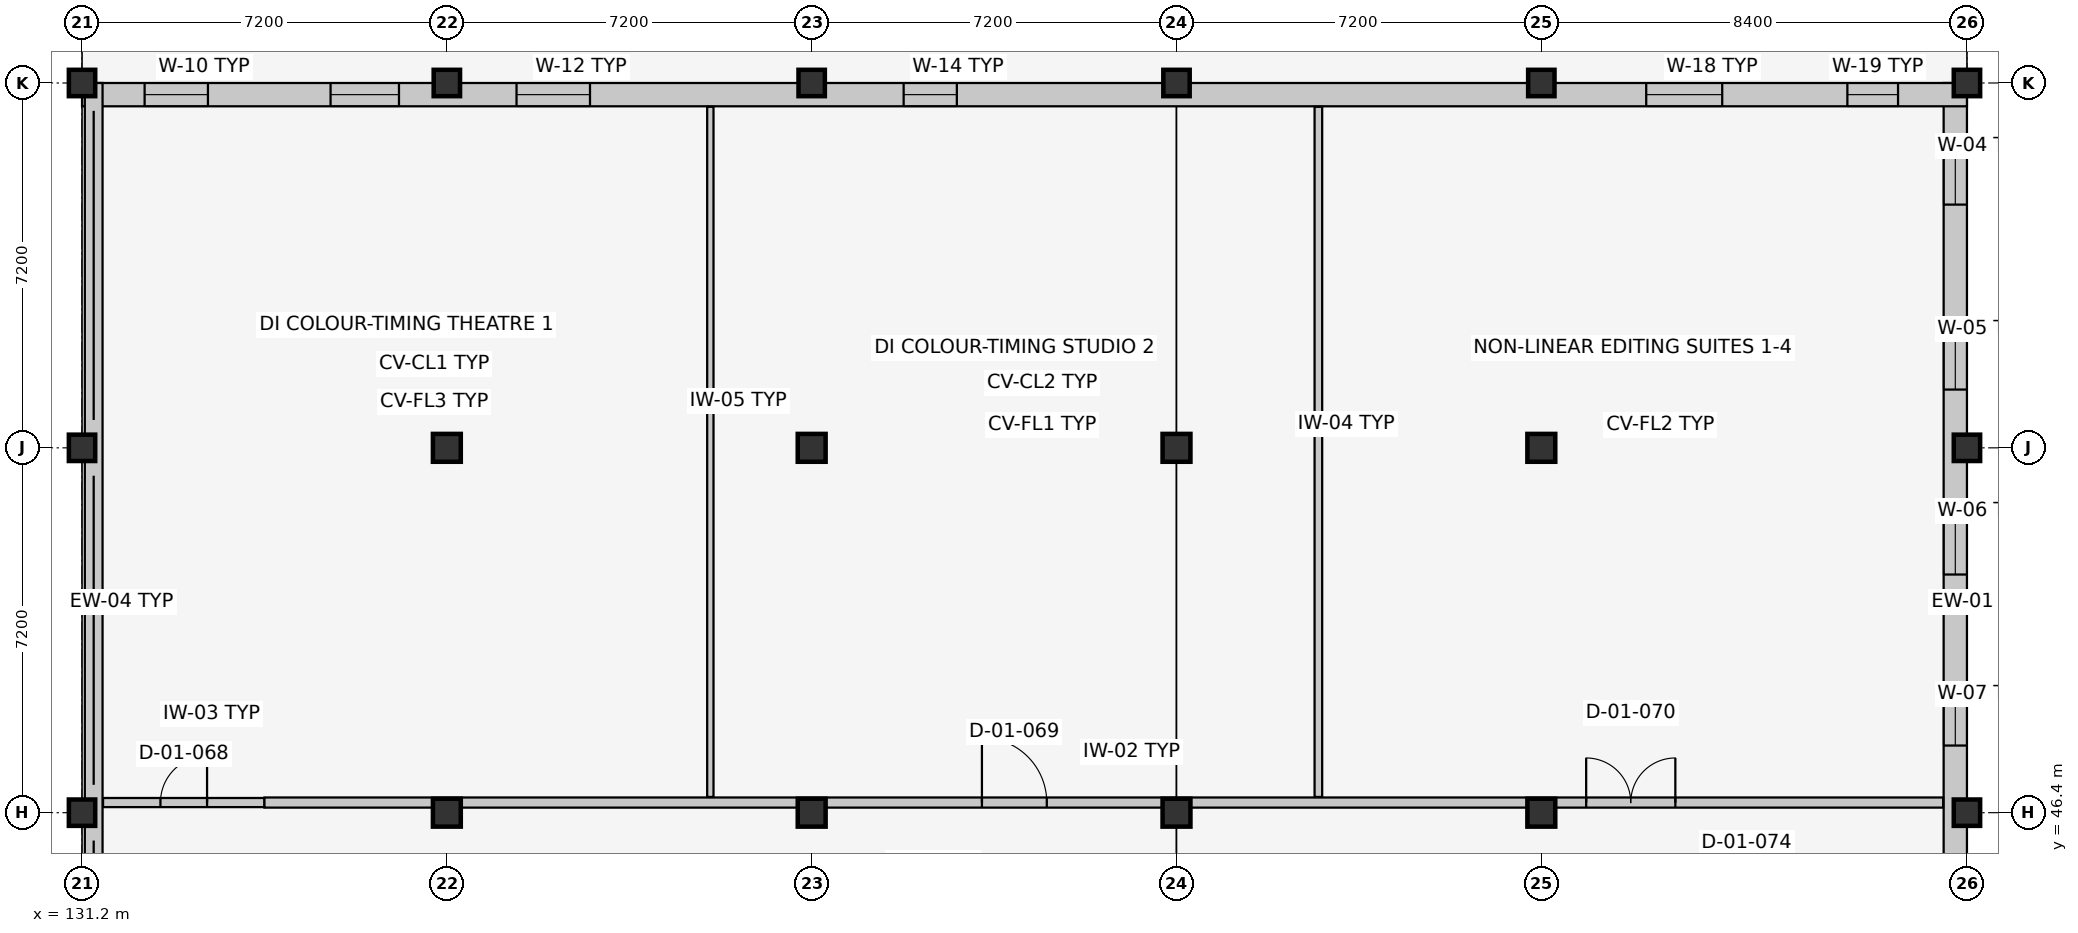
"""IFC4 building model, lengths in metres.
Left out: names, types, materials, properties, quantities, classifications, styles, units other than length and angle.
Written with IfcOpenShell. Run it as: python <this file> out.ifc"""

import sys

from ifc_helpers import new_model, si_unit, direction, frame, frame_2d, origin, origin_2d, place, context, subcontext, project, spatial, rectangle, extrude, element, fill, save


model = new_model("IFC4")
c1 = context("Model", 3, precision=1e-05, world=origin(), true_north=direction((0.0, 1.0)))
c2 = subcontext(c1, "Body", "Model", "MODEL_VIEW")
j1 = project(units=[si_unit("LENGTHUNIT", "METRE"), si_unit("PLANEANGLEUNIT", "RADIAN")], contexts=[c1])
p1 = place(None, origin())
s1 = spatial("IfcSite", under=j1, at=p1, CompositionType="ELEMENT")
p2 = place(p1, origin())
s2 = spatial("IfcBuilding", under=s1, at=p2, CompositionType="ELEMENT")
p3 = place(p2, frame((0.0, 0.0, 5.4)))
s3 = spatial("IfcBuildingStorey", under=s2, at=p3, CompositionType="ELEMENT", Elevation=5.4)
for number, where, z_axis, x_axis in (
    (1, (131.2, 46.4, 0.0), (0.0, 0.0, 1.0), (1.0, 0.0, 0.0)),
    (2, (131.2, 53.6, 0.0), (0.0, 0.0, 1.0), (1.0, 0.0, 0.0)),
    (3, (131.2, 60.8, 0.0), (0.0, 0.0, 1.0), (1.0, 0.0, 0.0)),
):
    element("IfcColumn", number, at=place(p3, frame(where, z_axis=z_axis, x_axis=x_axis)), inside=s3, PredefinedType="COLUMN", context=c2, shape_type="SweptSolid", body=[
        extrude(rectangle(XDim=0.52, YDim=0.52, at=origin_2d()), origin(), (0.0, 0.0, 1.0), 4.2),
    ])
for number, where, z_axis, x_axis in (
    (4, (138.4, 46.4, 0.0), (0.0, 0.0, 1.0), (1.0, 0.0, 0.0)),
    (5, (138.4, 53.6, 0.0), (0.0, 0.0, 1.0), (1.0, 0.0, 0.0)),
):
    element("IfcColumn", number, at=place(p3, frame(where, z_axis=z_axis, x_axis=x_axis)), inside=s3, PredefinedType="COLUMN", context=c2, shape_type="SweptSolid", body=[
        extrude(rectangle(XDim=0.55, YDim=0.55, at=origin_2d()), origin(), (0.0, 0.0, 1.0), 4.2),
    ])
p4 = place(p3, frame((138.4, 60.8, 0.0), z_axis=(0.0, 0.0, 1.0), x_axis=(1.0, 0.0, 0.0)))
e6 = element("IfcColumn", 6, at=p4, inside=s3, PredefinedType="COLUMN", context=c2, shape_type="SweptSolid", body=[
    extrude(rectangle(XDim=0.52, YDim=0.52, at=origin_2d()), origin(), (0.0, 0.0, 1.0), 4.2),
])
for number, where, z_axis, x_axis in (
    (7, (145.6, 46.4, 0.0), (0.0, 0.0, 1.0), (1.0, 0.0, 0.0)),
    (8, (145.6, 53.6, 0.0), (0.0, 0.0, 1.0), (1.0, 0.0, 0.0)),
):
    element("IfcColumn", number, at=place(p3, frame(where, z_axis=z_axis, x_axis=x_axis)), inside=s3, PredefinedType="COLUMN", context=c2, shape_type="SweptSolid", body=[
        extrude(rectangle(XDim=0.55, YDim=0.55, at=origin_2d()), origin(), (0.0, 0.0, 1.0), 4.2),
    ])
p5 = place(p3, frame((145.6, 60.8, 0.0), z_axis=(0.0, 0.0, 1.0), x_axis=(1.0, 0.0, 0.0)))
e9 = element("IfcColumn", 9, at=p5, inside=s3, PredefinedType="COLUMN", context=c2, shape_type="SweptSolid", body=[
    extrude(rectangle(XDim=0.52, YDim=0.52, at=origin_2d()), origin(), (0.0, 0.0, 1.0), 4.2),
])
for number, where, z_axis, x_axis in (
    (10, (152.8, 46.4, 0.0), (0.0, 0.0, 1.0), (1.0, 0.0, 0.0)),
    (11, (152.8, 53.6, 0.0), (0.0, 0.0, 1.0), (1.0, 0.0, 0.0)),
):
    element("IfcColumn", number, at=place(p3, frame(where, z_axis=z_axis, x_axis=x_axis)), inside=s3, PredefinedType="COLUMN", context=c2, shape_type="SweptSolid", body=[
        extrude(rectangle(XDim=0.55, YDim=0.55, at=origin_2d()), origin(), (0.0, 0.0, 1.0), 4.2),
    ])
p6 = place(p3, frame((152.8, 60.8, 0.0), z_axis=(0.0, 0.0, 1.0), x_axis=(1.0, 0.0, 0.0)))
e12 = element("IfcColumn", 12, at=p6, inside=s3, PredefinedType="COLUMN", context=c2, shape_type="SweptSolid", body=[
    extrude(rectangle(XDim=0.52, YDim=0.52, at=origin_2d()), origin(), (0.0, 0.0, 1.0), 4.2),
])
for number, where, z_axis, x_axis in (
    (13, (160.0, 46.4, 0.0), (0.0, 0.0, 1.0), (1.0, 0.0, 0.0)),
    (14, (160.0, 53.6, 0.0), (0.0, 0.0, 1.0), (1.0, 0.0, 0.0)),
):
    element("IfcColumn", number, at=place(p3, frame(where, z_axis=z_axis, x_axis=x_axis)), inside=s3, PredefinedType="COLUMN", context=c2, shape_type="SweptSolid", body=[
        extrude(rectangle(XDim=0.55, YDim=0.55, at=origin_2d()), origin(), (0.0, 0.0, 1.0), 4.2),
    ])
for number, where, z_axis, x_axis in (
    (15, (160.0, 60.8, 0.0), (0.0, 0.0, 1.0), (1.0, 0.0, 0.0)),
    (16, (168.4, 46.4, 0.0), (0.0, 0.0, 1.0), (1.0, 0.0, 0.0)),
    (17, (168.4, 53.6, 0.0), (0.0, 0.0, 1.0), (1.0, 0.0, 0.0)),
    (18, (168.4, 60.8, 0.0), (0.0, 0.0, 1.0), (1.0, 0.0, 0.0)),
):
    element("IfcColumn", number, at=place(p3, frame(where, z_axis=z_axis, x_axis=x_axis)), inside=s3, PredefinedType="COLUMN", context=c2, shape_type="SweptSolid", body=[
        extrude(rectangle(XDim=0.52, YDim=0.52, at=origin_2d()), origin(), (0.0, 0.0, 1.0), 4.2),
    ])
p7 = place(p3, frame((168.17, 60.8, 0.0), z_axis=(0.0, 0.0, 1.0), x_axis=(0.0, -1.0, 0.0)))
e19 = element("IfcWall", 19, at=p7, inside=s3, PredefinedType="SOLIDWALL", context=c2, shape_type="SweptSolid", body=[
    extrude(rectangle(XDim=21.6, YDim=0.46, at=frame_2d((10.8, 0.0))), origin(), (0.0, 0.0, 1.0), 3.215),
])
p8 = place(p7, frame((1.2, 0.0, 0.9)))
e20 = element("IfcOpeningElement", 20, at=p8, cuts=e19, PredefinedType="OPENING", context=c2, shape_type="SweptSolid", body=[
    extrude(rectangle(XDim=1.2, YDim=1.35, at=frame_2d((0.6, 0.675))), frame((0.0, 0.242, 0.0), z_axis=(0.0, -1.0, 0.0), x_axis=(1.0, 0.0, 0.0)), (0.0, 0.0, 1.0), 0.484),
])
p9 = place(p7, frame((4.75, 0.0, 0.9)))
e21 = element("IfcOpeningElement", 21, at=p9, cuts=e19, PredefinedType="OPENING", context=c2, shape_type="SweptSolid", body=[
    extrude(rectangle(XDim=1.3, YDim=1.35, at=frame_2d((0.65, 0.675))), frame((0.0, 0.242, 0.0), z_axis=(0.0, -1.0, 0.0), x_axis=(1.0, 0.0, 0.0)), (0.0, 0.0, 1.0), 0.484),
])
p10 = place(p7, frame((8.3, 0.0, 0.9)))
e22 = element("IfcOpeningElement", 22, at=p10, cuts=e19, PredefinedType="OPENING", context=c2, shape_type="SweptSolid", body=[
    extrude(rectangle(XDim=1.4, YDim=1.35, at=frame_2d((0.7, 0.675))), frame((0.0, 0.242, 0.0), z_axis=(0.0, -1.0, 0.0), x_axis=(1.0, 0.0, 0.0)), (0.0, 0.0, 1.0), 0.484),
])
p11 = place(p7, frame((12.125, 0.0, 0.9)))
e23 = element("IfcOpeningElement", 23, at=p11, cuts=e19, PredefinedType="OPENING", context=c2, shape_type="SweptSolid", body=[
    extrude(rectangle(XDim=0.95, YDim=1.45, at=frame_2d((0.475, 0.725))), frame((0.0, 0.242, 0.0), z_axis=(0.0, -1.0, 0.0), x_axis=(1.0, 0.0, 0.0)), (0.0, 0.0, 1.0), 0.484),
])
p12 = place(p7, frame((19.225, 0.0, 0.9)))
e24 = element("IfcOpeningElement", 24, at=p12, cuts=e19, PredefinedType="OPENING", context=c2, shape_type="SweptSolid", body=[
    extrude(rectangle(XDim=1.15, YDim=1.45, at=frame_2d((0.575, 0.725))), frame((0.0, 0.242, 0.0), z_axis=(0.0, -1.0, 0.0), x_axis=(1.0, 0.0, 0.0)), (0.0, 0.0, 1.0), 0.484),
])
p13 = place(p3, frame((131.2, 60.57, 0.0), z_axis=(0.0, 0.0, 1.0), x_axis=(1.0, 0.0, 0.0)))
e25 = element("IfcWall", 25, at=p13, inside=s3, PredefinedType="SOLIDWALL", context=c2, shape_type="SweptSolid", body=[
    extrude(rectangle(XDim=37.2, YDim=0.46, at=frame_2d((18.6, 0.0))), origin(), (0.0, 0.0, 1.0), 3.115),
])
p14 = place(p13, frame((1.235, 0.0, 0.9)))
e26 = element("IfcOpeningElement", 26, at=p14, cuts=e25, PredefinedType="OPENING", context=c2, shape_type="SweptSolid", body=[
    extrude(rectangle(XDim=1.25, YDim=1.45, at=frame_2d((0.625, 0.725))), frame((0.0, 0.242, 0.0), z_axis=(0.0, -1.0, 0.0), x_axis=(1.0, 0.0, 0.0)), (0.0, 0.0, 1.0), 0.484),
])
p15 = place(p13, frame((4.905, 0.0, 0.9)))
e27 = element("IfcOpeningElement", 27, at=p15, cuts=e25, PredefinedType="OPENING", context=c2, shape_type="SweptSolid", body=[
    extrude(rectangle(XDim=1.35, YDim=1.45, at=frame_2d((0.675, 0.725))), frame((0.0, 0.242, 0.0), z_axis=(0.0, -1.0, 0.0), x_axis=(1.0, 0.0, 0.0)), (0.0, 0.0, 1.0), 0.484),
])
p16 = place(p13, frame((8.575, 0.0, 0.9)))
e28 = element("IfcOpeningElement", 28, at=p16, cuts=e25, PredefinedType="OPENING", context=c2, shape_type="SweptSolid", body=[
    extrude(rectangle(XDim=1.45, YDim=1.45, at=frame_2d((0.725, 0.725))), frame((0.0, 0.242, 0.0), z_axis=(0.0, -1.0, 0.0), x_axis=(1.0, 0.0, 0.0)), (0.0, 0.0, 1.0), 0.484),
])
p17 = place(p13, frame((16.215, 0.0, 0.9)))
e29 = element("IfcOpeningElement", 29, at=p17, cuts=e25, PredefinedType="OPENING", context=c2, shape_type="SweptSolid", body=[
    extrude(rectangle(XDim=1.05, YDim=1.6, at=frame_2d((0.525, 0.8))), frame((0.0, 0.242, 0.0), z_axis=(0.0, -1.0, 0.0), x_axis=(1.0, 0.0, 0.0)), (0.0, 0.0, 1.0), 0.484),
])
p18 = place(p13, frame((30.87, 0.0, 0.9)))
e30 = element("IfcOpeningElement", 30, at=p18, cuts=e25, PredefinedType="OPENING", context=c2, shape_type="SweptSolid", body=[
    extrude(rectangle(XDim=1.5, YDim=1.6, at=frame_2d((0.75, 0.8))), frame((0.0, 0.242, 0.0), z_axis=(0.0, -1.0, 0.0), x_axis=(1.0, 0.0, 0.0)), (0.0, 0.0, 1.0), 0.484),
])
p19 = place(p13, frame((34.84, 0.0, 0.9)))
e31 = element("IfcOpeningElement", 31, at=p19, cuts=e25, PredefinedType="OPENING", context=c2, shape_type="SweptSolid", body=[
    extrude(rectangle(XDim=1.0, YDim=1.75, at=frame_2d((0.5, 0.875))), frame((0.0, 0.242, 0.0), z_axis=(0.0, -1.0, 0.0), x_axis=(1.0, 0.0, 0.0)), (0.0, 0.0, 1.0), 0.484),
])
p20 = place(p3, frame((131.43, 39.2, 0.0), z_axis=(0.0, 0.0, 1.0), x_axis=(0.0, 1.0, 0.0)))
e32 = element("IfcWall", 32, at=p20, inside=s3, PredefinedType="SOLIDWALL", context=c2, shape_type="SweptSolid", body=[
    extrude(rectangle(XDim=21.6, YDim=0.35, at=frame_2d((10.8, 0.0))), origin(), (0.0, 0.0, 1.0), 0.85),
])
p21 = place(p3, frame((131.615, 46.6, 0.0), z_axis=(0.0, 0.0, 1.0), x_axis=(1.0, 0.0, 0.0)))
e33 = element("IfcWall", 33, at=p21, inside=s3, PredefinedType="PARTITIONING", context=c2, shape_type="SweptSolid", body=[
    extrude(rectangle(XDim=3.185, YDim=0.18, at=frame_2d((1.593, 0.0))), origin(), (0.0, 0.0, 1.0), 3.285),
])
p22 = place(p21, frame((1.133, 0.0, 0.0)))
e34 = element("IfcOpeningElement", 34, at=p22, cuts=e33, PredefinedType="OPENING", context=c2, shape_type="SweptSolid", body=[
    extrude(rectangle(XDim=0.92, YDim=2.08, at=frame_2d((0.46, 1.04))), frame((0.0, 0.102, 0.0), z_axis=(0.0, -1.0, 0.0), x_axis=(1.0, 0.0, 0.0)), (0.0, 0.0, 1.0), 0.204),
])
p23 = place(p3, frame((134.8, 46.6, 0.0), z_axis=(0.0, 0.0, 1.0), x_axis=(1.0, 0.0, 0.0)))
e35 = element("IfcWall", 35, at=p23, inside=s3, PredefinedType="PARTITIONING", context=c2, shape_type="SweptSolid", body=[
    extrude(rectangle(XDim=33.13, YDim=0.2, at=frame_2d((16.565, 0.0))), origin(), (0.0, 0.0, 1.0), 2.935),
])
p24 = place(p23, frame((14.16, 0.0, 0.0)))
e36 = element("IfcOpeningElement", 36, at=p24, cuts=e35, PredefinedType="OPENING", context=c2, shape_type="SweptSolid", body=[
    extrude(rectangle(XDim=1.28, YDim=2.2, at=frame_2d((0.64, 1.1))), frame((0.0, 0.112, 0.0), z_axis=(0.0, -1.0, 0.0), x_axis=(1.0, 0.0, 0.0)), (0.0, 0.0, 1.0), 0.224),
])
p25 = place(p23, frame((26.085, 0.0, 0.0)))
e37 = element("IfcOpeningElement", 37, at=p25, cuts=e35, PredefinedType="OPENING", context=c2, shape_type="SweptSolid", body=[
    extrude(rectangle(XDim=1.76, YDim=2.3, at=frame_2d((0.88, 1.15))), frame((0.0, 0.112, 0.0), z_axis=(0.0, -1.0, 0.0), x_axis=(1.0, 0.0, 0.0)), (0.0, 0.0, 1.0), 0.224),
])
p26 = place(p3, frame((143.6, 46.71, 0.0), z_axis=(0.0, 0.0, 1.0), x_axis=(0.0, 1.0, 0.0)))
e38 = element("IfcWall", 38, at=p26, inside=s3, PredefinedType="PARTITIONING", context=c2, shape_type="SweptSolid", body=[
    extrude(rectangle(XDim=13.62, YDim=0.125, at=frame_2d((6.81, 0.0))), origin(), (0.0, 0.0, 1.0), 3.96),
])
p27 = place(p3, frame((155.6, 46.71, 0.0), z_axis=(0.0, 0.0, 1.0), x_axis=(0.0, 1.0, 0.0)))
e39 = element("IfcWall", 39, at=p27, inside=s3, PredefinedType="PARTITIONING", context=c2, shape_type="SweptSolid", body=[
    extrude(rectangle(XDim=13.62, YDim=0.15, at=frame_2d((6.81, 0.0))), origin(), (0.0, 0.0, 1.0), 3.96),
])
p28 = place(p8, origin())
e40 = element("IfcWindow", 40, at=p28, inside=s3, PartitioningType="SINGLE_PANEL", PredefinedType="WINDOW", context=c2, shape_type="SweptSolid", body=[
    extrude(rectangle(XDim=1.2, YDim=1.35, at=frame_2d((0.6, 0.675))), frame((0.0, 0.03, 0.0), z_axis=(0.0, -1.0, 0.0), x_axis=(1.0, 0.0, 0.0)), (0.0, 0.0, 1.0), 0.06),
])
fill(e20, e40)
p29 = place(p9, origin())
e41 = element("IfcWindow", 41, at=p29, inside=s3, PartitioningType="SINGLE_PANEL", PredefinedType="WINDOW", context=c2, shape_type="SweptSolid", body=[
    extrude(rectangle(XDim=1.3, YDim=1.35, at=frame_2d((0.65, 0.675))), frame((0.0, 0.03, 0.0), z_axis=(0.0, -1.0, 0.0), x_axis=(1.0, 0.0, 0.0)), (0.0, 0.0, 1.0), 0.06),
])
fill(e21, e41)
p30 = place(p10, origin())
e42 = element("IfcWindow", 42, at=p30, inside=s3, PartitioningType="SINGLE_PANEL", PredefinedType="WINDOW", context=c2, shape_type="SweptSolid", body=[
    extrude(rectangle(XDim=1.4, YDim=1.35, at=frame_2d((0.7, 0.675))), frame((0.0, 0.03, 0.0), z_axis=(0.0, -1.0, 0.0), x_axis=(1.0, 0.0, 0.0)), (0.0, 0.0, 1.0), 0.06),
])
fill(e22, e42)
p31 = place(p11, origin())
e43 = element("IfcWindow", 43, at=p31, inside=s3, PartitioningType="SINGLE_PANEL", PredefinedType="WINDOW", context=c2, shape_type="SweptSolid", body=[
    extrude(rectangle(XDim=0.95, YDim=1.45, at=frame_2d((0.475, 0.725))), frame((0.0, 0.03, 0.0), z_axis=(0.0, -1.0, 0.0), x_axis=(1.0, 0.0, 0.0)), (0.0, 0.0, 1.0), 0.06),
])
fill(e23, e43)
p32 = place(p14, origin())
e44 = element("IfcWindow", 44, at=p32, inside=s3, PartitioningType="SINGLE_PANEL", PredefinedType="WINDOW", context=c2, shape_type="SweptSolid", body=[
    extrude(rectangle(XDim=1.25, YDim=1.45, at=frame_2d((0.625, 0.725))), frame((0.0, 0.03, 0.0), z_axis=(0.0, -1.0, 0.0), x_axis=(1.0, 0.0, 0.0)), (0.0, 0.0, 1.0), 0.06),
])
fill(e26, e44)
p33 = place(p15, origin())
e45 = element("IfcWindow", 45, at=p33, inside=s3, PartitioningType="SINGLE_PANEL", PredefinedType="WINDOW", context=c2, shape_type="SweptSolid", body=[
    extrude(rectangle(XDim=1.35, YDim=1.45, at=frame_2d((0.675, 0.725))), frame((0.0, 0.03, 0.0), z_axis=(0.0, -1.0, 0.0), x_axis=(1.0, 0.0, 0.0)), (0.0, 0.0, 1.0), 0.06),
])
fill(e27, e45)
p34 = place(p16, origin())
e46 = element("IfcWindow", 46, at=p34, inside=s3, PartitioningType="SINGLE_PANEL", PredefinedType="WINDOW", context=c2, shape_type="SweptSolid", body=[
    extrude(rectangle(XDim=1.45, YDim=1.45, at=frame_2d((0.725, 0.725))), frame((0.0, 0.03, 0.0), z_axis=(0.0, -1.0, 0.0), x_axis=(1.0, 0.0, 0.0)), (0.0, 0.0, 1.0), 0.06),
])
fill(e28, e46)
p35 = place(p17, origin())
e47 = element("IfcWindow", 47, at=p35, inside=s3, PartitioningType="SINGLE_PANEL", PredefinedType="WINDOW", context=c2, shape_type="SweptSolid", body=[
    extrude(rectangle(XDim=1.05, YDim=1.6, at=frame_2d((0.525, 0.8))), frame((0.0, 0.03, 0.0), z_axis=(0.0, -1.0, 0.0), x_axis=(1.0, 0.0, 0.0)), (0.0, 0.0, 1.0), 0.06),
])
fill(e29, e47)
p36 = place(p18, origin())
e48 = element("IfcWindow", 48, at=p36, inside=s3, PartitioningType="SINGLE_PANEL", PredefinedType="WINDOW", context=c2, shape_type="SweptSolid", body=[
    extrude(rectangle(XDim=1.5, YDim=1.6, at=frame_2d((0.75, 0.8))), frame((0.0, 0.03, 0.0), z_axis=(0.0, -1.0, 0.0), x_axis=(1.0, 0.0, 0.0)), (0.0, 0.0, 1.0), 0.06),
])
fill(e30, e48)
p37 = place(p19, origin())
e49 = element("IfcWindow", 49, at=p37, inside=s3, PartitioningType="SINGLE_PANEL", PredefinedType="WINDOW", context=c2, shape_type="SweptSolid", body=[
    extrude(rectangle(XDim=1.0, YDim=1.75, at=frame_2d((0.5, 0.875))), frame((0.0, 0.03, 0.0), z_axis=(0.0, -1.0, 0.0), x_axis=(1.0, 0.0, 0.0)), (0.0, 0.0, 1.0), 0.06),
])
fill(e31, e49)
p38 = place(p22, origin())
e50 = element("IfcDoor", 50, at=p38, inside=s3, OperationType="SINGLE_SWING_RIGHT", PredefinedType="DOOR", context=c2, shape_type="SweptSolid", body=[
    extrude(rectangle(XDim=0.92, YDim=2.08, at=frame_2d((0.46, 1.04))), frame((0.0, 0.025, 0.0), z_axis=(0.0, -1.0, 0.0), x_axis=(1.0, 0.0, 0.0)), (0.0, 0.0, 1.0), 0.05),
])
fill(e34, e50)
p39 = place(p24, origin())
e51 = element("IfcDoor", 51, at=p39, inside=s3, OperationType="SINGLE_SWING_LEFT", PredefinedType="DOOR", context=c2, shape_type="SweptSolid", body=[
    extrude(rectangle(XDim=1.28, YDim=2.2, at=frame_2d((0.64, 1.1))), frame((0.0, 0.025, 0.0), z_axis=(0.0, -1.0, 0.0), x_axis=(1.0, 0.0, 0.0)), (0.0, 0.0, 1.0), 0.05),
])
fill(e36, e51)
p40 = place(p25, origin())
e52 = element("IfcDoor", 52, at=p40, inside=s3, OperationType="DOUBLE_DOOR_SINGLE_SWING", PredefinedType="DOOR", context=c2, shape_type="SweptSolid", body=[
    extrude(rectangle(XDim=1.76, YDim=2.3, at=frame_2d((0.88, 1.15))), frame((0.0, 0.025, 0.0), z_axis=(0.0, -1.0, 0.0), x_axis=(1.0, 0.0, 0.0)), (0.0, 0.0, 1.0), 0.05),
])
fill(e37, e52)
save(model, sys.argv[1])
